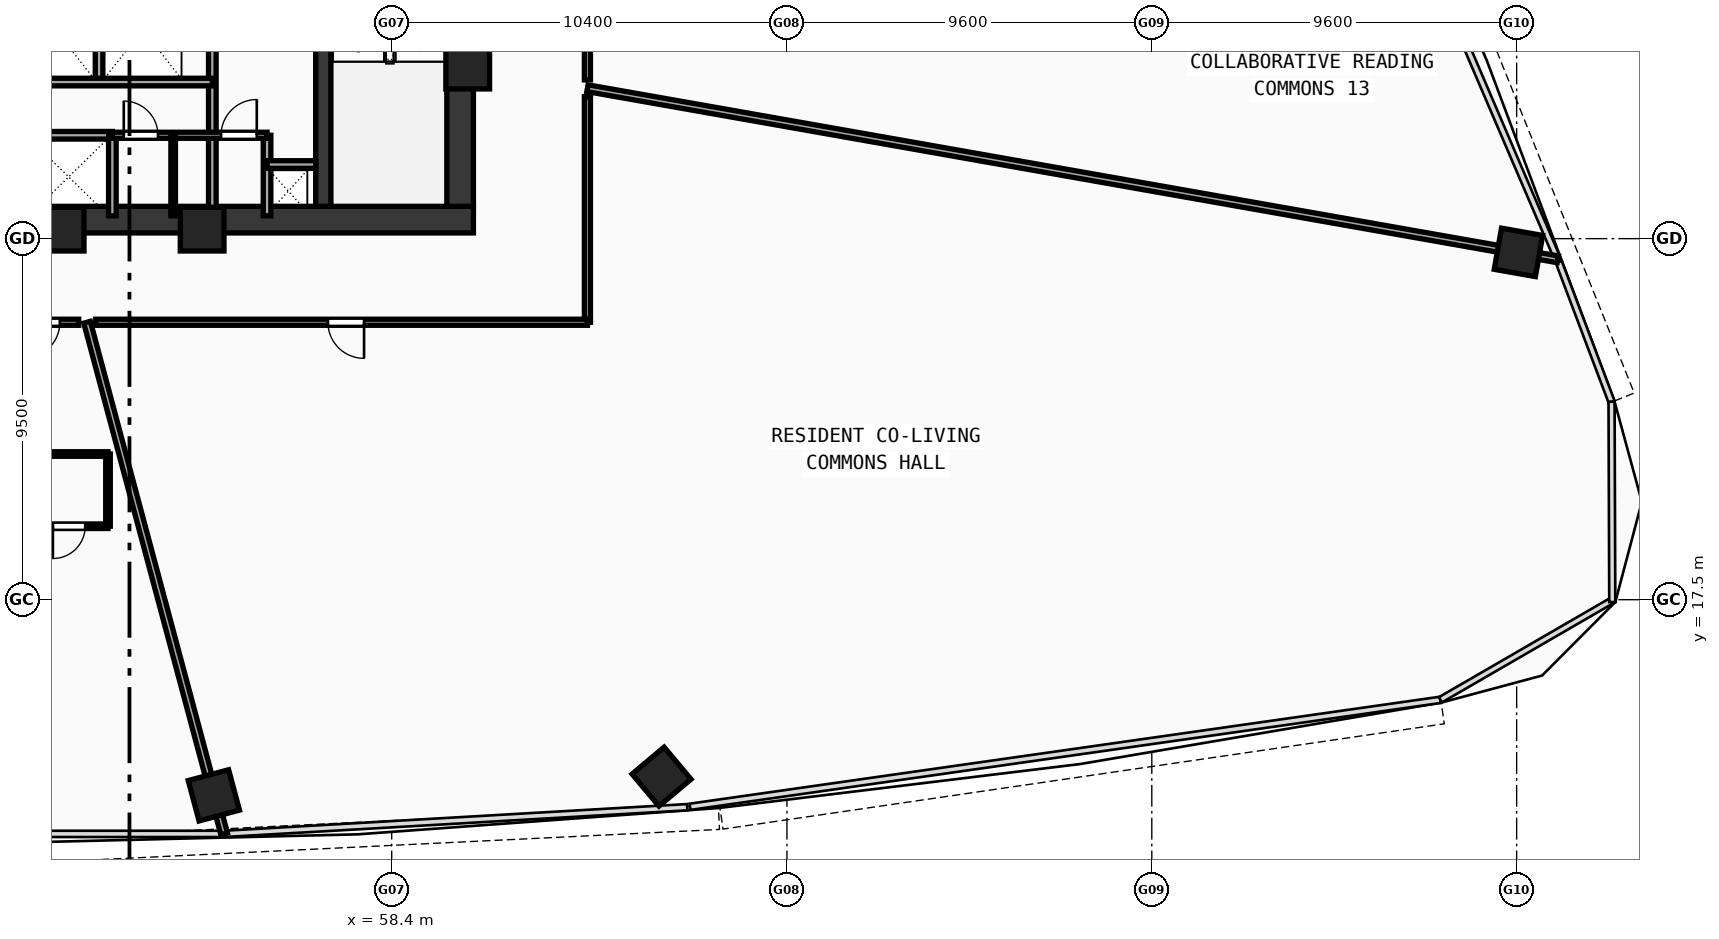
"""IFC4 building model, lengths in metres.
Left out: names, types, materials, properties, quantities, classifications, styles, units other than length and angle.
Written with IfcOpenShell. Run it as: python <this file> out.ifc"""

import sys

from ifc_helpers import new_model, si_unit, direction, frame, frame_2d, origin, origin_with_axes, origin_2d, place, context, subcontext, project, spatial, rectangle, hollow_rectangle, extrude, source, transform, mapped, element, fill, save


model = new_model("IFC4")
c1 = context("Model", 3, precision=1e-05, world=origin(), true_north=direction((0.0, 1.0)))
c2 = subcontext(c1, "Body", "Model", "MODEL_VIEW")
j1 = project(units=[si_unit("LENGTHUNIT", "METRE"), si_unit("PLANEANGLEUNIT", "RADIAN")], contexts=[c1])
p1 = place(None, origin())
s1 = spatial("IfcSite", under=j1, at=p1, CompositionType="ELEMENT")
p2 = place(p1, origin())
s2 = spatial("IfcBuilding", under=s1, at=p2, CompositionType="ELEMENT")
p3 = place(p2, frame((0.0, 0.0, 70.33)))
s3 = spatial("IfcBuildingStorey", under=s2, at=p3, CompositionType="ELEMENT", Elevation=70.33)
p4 = place(p3, frame((35.45, 27.5, 0.0), z_axis=(0.0, 0.0, 1.0), x_axis=(1.0, 0.0, 0.0)))
e1 = element("IfcWall", 1, at=p4, inside=s3, PredefinedType="SHEAR", context=c2, shape_type="SweptSolid", body=[
    extrude(rectangle(XDim=25.1, YDim=0.7, at=frame_2d((12.55, 0.0))), origin(), (0.0, 0.0, 1.0), 5.77),
])
p5 = place(p3, frame((60.2, 27.85, 0.0), z_axis=(0.0, 0.0, 1.0), x_axis=(0.0, 1.0, 0.0)))
e2 = element("IfcWall", 2, at=p5, inside=s3, PredefinedType="SHEAR", context=c2, shape_type="SweptSolid", body=[
    extrude(rectangle(XDim=12.0, YDim=0.7, at=frame_2d((6.0, 0.0))), origin(), (0.0, 0.0, 1.0), 5.77),
])
p6 = place(p3, frame((56.6, 27.85, 0.0), z_axis=(0.0, 0.0, 1.0), x_axis=(0.0, 1.0, 0.0)))
e3 = element("IfcWall", 3, at=p6, inside=s3, PredefinedType="SHEAR", context=c2, shape_type="SweptSolid", body=[
    extrude(rectangle(XDim=12.0, YDim=0.4, at=frame_2d((6.0, 0.0))), origin(), (0.0, 0.0, 1.0), 5.77),
])
p7 = place(p6, frame((9.9, 0.0, 0.0)))
e4 = element("IfcOpeningElement", 4, at=p7, cuts=e3, PredefinedType="OPENING", context=c2, shape_type="SweptSolid", body=[
    extrude(rectangle(XDim=1.1, YDim=2.1, at=frame_2d((0.55, 1.05))), frame((0.0, 0.21, 0.0), z_axis=(0.0, -1.0, 0.0), x_axis=(1.0, 0.0, 0.0)), (0.0, 0.0, 1.0), 0.42),
])
m1 = source(origin(), c2, "Body", "SweptSolid", [
    extrude(hollow_rectangle(XDim=1.15, YDim=1.15, WallThickness=0.048, at=origin_2d()), origin(), (0.0, 0.0, 1.0), 6.03),
])
for number, where, z_axis, x_axis in (
    (5, (49.729, 27.25, -0.26), (0.0, 0.0, 1.0), (1.0, 0.0, 0.0)),
    (6, (53.412, 27.25, -0.26), (0.0, 0.0, 1.0), (1.0, 0.0, 0.0)),
    (7, (60.4, 31.513, -0.26), (0.0, 0.0, 1.0), (1.0, 0.0, 0.0)),
):
    element("IfcColumn", number, at=place(p3, frame(where, z_axis=z_axis, x_axis=x_axis)), inside=s3, PredefinedType="COLUMN", context=c2, shape_type="MappedRepresentation", body=[
        mapped(m1, transform((0.0, 0.0, 0.0), scale=1.0)),
    ])
m2 = source(origin(), c2, "Body", "SweptSolid", [
    extrude(hollow_rectangle(XDim=1.1, YDim=1.1, WallThickness=0.045, at=origin_2d()), origin(), (0.0, 0.0, 1.0), 6.03),
])
for number, where, z_axis, x_axis in (
    (8, (53.72, 12.352, -0.26), (0.0, 0.0, 1.0), (0.966, 0.259, 0.0)),
    (9, (65.5, 12.844, -0.26), (0.0, 0.0, 1.0), (0.766, 0.643, 0.0)),
    (10, (88.048, 26.638, -0.26), (0.0, 0.0, 1.0), (0.174, 0.985, 0.0)),
):
    element("IfcColumn", number, at=place(p3, frame(where, z_axis=z_axis, x_axis=x_axis)), inside=s3, PredefinedType="COLUMN", context=c2, shape_type="MappedRepresentation", body=[
        mapped(m2, transform((0.0, 0.0, 0.0), scale=1.0)),
    ])
p8 = place(p3, frame((53.68, 27.6, 0.0), z_axis=(0.0, 0.0, 1.0), x_axis=(0.0, 1.0, 0.0)))
e11 = element("IfcWall", 11, at=p8, inside=s3, PredefinedType="SOLIDWALL", context=c2, shape_type="SweptSolid", body=[
    extrude(rectangle(XDim=9.05, YDim=0.2, at=frame_2d((4.525, 0.0))), origin(), (0.0, 0.0, 1.0), 2.42),
])
p9 = place(p8, frame((6.9, 0.0, 0.0)))
e12 = element("IfcOpeningElement", 12, at=p9, cuts=e11, PredefinedType="OPENING", context=c2, shape_type="SweptSolid", body=[
    extrude(rectangle(XDim=1.05, YDim=2.1, at=frame_2d((0.525, 1.05))), frame((0.0, 0.11, 0.0), z_axis=(0.0, -1.0, 0.0), x_axis=(1.0, 0.0, 0.0)), (0.0, 0.0, 1.0), 0.22),
])
p10 = place(p3, frame((50.7, 31.12, 0.0), z_axis=(0.0, 0.0, 1.0), x_axis=(0.0, 1.0, 0.0)))
e13 = element("IfcWall", 13, at=p10, inside=s3, PredefinedType="SOLIDWALL", context=c2, shape_type="SweptSolid", body=[
    extrude(rectangle(XDim=2.7, YDim=0.2, at=frame_2d((1.35, 0.0))), origin(), (0.0, 0.0, 1.0), 5.77),
])
p11 = place(p3, frame((43.85, 29.72, 0.0), z_axis=(0.0, 0.0, 1.0), x_axis=(1.0, 0.0, 0.0)))
e14 = element("IfcWall", 14, at=p11, inside=s3, PredefinedType="SOLIDWALL", context=c2, shape_type="SweptSolid", body=[
    extrude(rectangle(XDim=7.2, YDim=0.2, at=frame_2d((3.6, 0.0))), origin(), (0.0, 0.0, 1.0), 5.77),
])
p12 = place(p3, frame((51.05, 27.6, 0.0), z_axis=(0.0, 0.0, 1.0), x_axis=(0.0, 1.0, 0.0)))
e15 = element("IfcWall", 15, at=p12, inside=s3, PredefinedType="SOLIDWALL", context=c2, shape_type="SweptSolid", body=[
    extrude(rectangle(XDim=2.12, YDim=0.2, at=frame_2d((1.06, 0.0))), origin(), (0.0, 0.0, 1.0), 5.77),
])
p13 = place(p3, frame((43.85, 31.12, 0.0), z_axis=(0.0, 0.0, 1.0), x_axis=(1.0, 0.0, 0.0)))
e16 = element("IfcWall", 16, at=p13, inside=s3, PredefinedType="SOLIDWALL", context=c2, shape_type="SweptSolid", body=[
    extrude(rectangle(XDim=9.83, YDim=0.2, at=frame_2d((4.915, 0.0))), origin(), (0.0, 0.0, 1.0), 5.77),
])
p14 = place(p3, frame((55.12, 27.6, 0.0), z_axis=(0.0, 0.0, 1.0), x_axis=(0.0, 1.0, 0.0)))
e17 = element("IfcWall", 17, at=p14, inside=s3, PredefinedType="SOLIDWALL", context=c2, shape_type="SweptSolid", body=[
    extrude(rectangle(XDim=2.12, YDim=0.2, at=frame_2d((1.06, 0.0))), origin(), (0.0, 0.0, 1.0), 5.77),
])
p15 = place(p3, frame((55.12, 28.95, 0.0), z_axis=(0.0, 0.0, 1.0), x_axis=(1.0, 0.0, 0.0)))
e18 = element("IfcWall", 18, at=p15, inside=s3, PredefinedType="SOLIDWALL", context=c2, shape_type="SweptSolid", body=[
    extrude(rectangle(XDim=1.28, YDim=0.2, at=frame_2d((0.64, 0.0))), origin(), (0.0, 0.0, 1.0), 5.77),
])
p16 = place(p3, frame((51.05, 29.72, 0.0), z_axis=(0.0, 0.0, 1.0), x_axis=(1.0, 0.0, 0.0)))
e19 = element("IfcWall", 19, at=p16, inside=s3, PredefinedType="PARTITIONING", context=c2, shape_type="SweptSolid", body=[
    extrude(rectangle(XDim=4.07, YDim=0.16, at=frame_2d((2.035, 0.0))), origin(), (0.0, 0.0, 1.0), 5.77),
])
p17 = place(p16, frame((0.3, 0.0, 0.0)))
e20 = element("IfcOpeningElement", 20, at=p17, cuts=e19, PredefinedType="OPENING", context=c2, shape_type="SweptSolid", body=[
    extrude(rectangle(XDim=0.9, YDim=2.1, at=frame_2d((0.45, 1.05))), frame((0.0, 0.09, 0.0), z_axis=(0.0, -1.0, 0.0), x_axis=(1.0, 0.0, 0.0)), (0.0, 0.0, 1.0), 0.18),
])
p18 = place(p16, frame((2.86, 0.0, 0.0)))
e21 = element("IfcOpeningElement", 21, at=p18, cuts=e19, PredefinedType="OPENING", context=c2, shape_type="SweptSolid", body=[
    extrude(rectangle(XDim=0.94, YDim=2.1, at=frame_2d((0.47, 1.05))), frame((0.0, 0.09, 0.0), z_axis=(0.0, -1.0, 0.0), x_axis=(1.0, 0.0, 0.0)), (0.0, 0.0, 1.0), 0.18),
])
p19 = place(p3, frame((52.65, 27.6, 0.0), z_axis=(0.0, 0.0, 1.0), x_axis=(0.0, 1.0, 0.0)))
e22 = element("IfcWall", 22, at=p19, inside=s3, PredefinedType="PARTITIONING", context=c2, shape_type="SweptSolid", body=[
    extrude(rectangle(XDim=2.12, YDim=0.12, at=frame_2d((1.06, 0.0))), origin(), (0.0, 0.0, 1.0), 5.77),
])
p20 = place(p3, frame((50.385, 24.8, 0.0), z_axis=(0.0, 0.0, 1.0), x_axis=(0.258819267056, -0.965925766817, 0.0)))
e23 = element("IfcWall", 23, at=p20, inside=s3, PredefinedType="PARTITIONING", context=c2, shape_type="SweptSolid", body=[
    extrude(rectangle(XDim=13.937, YDim=0.18, at=frame_2d((6.969, 0.0))), origin(), (0.0, 0.0, 1.0), 2.42),
])
p21 = place(p3, frame((63.55, 30.958, 0.0), z_axis=(0.0, 0.0, 1.0), x_axis=(0.984809239356, -0.173639747982, 0.0)))
e24 = element("IfcWall", 24, at=p21, inside=s3, PredefinedType="PARTITIONING", context=c2, shape_type="SweptSolid", body=[
    extrude(rectangle(XDim=25.926, YDim=0.18, at=frame_2d((12.963, 0.0))), origin(), (0.0, 0.0, 1.0), 2.42),
])
p22 = place(p3, frame((63.55, 34.023, 0.0), z_axis=(0.0, 0.0, 1.0), x_axis=(0.0, -1.0, 0.0)))
e25 = element("IfcWall", 25, at=p22, inside=s3, PredefinedType="PARTITIONING", context=c2, shape_type="SweptSolid", body=[
    extrude(rectangle(XDim=2.845, YDim=0.16, at=frame_2d((1.423, 0.0))), origin(), (0.0, 0.0, 1.0), 2.42),
])
p23 = place(p22, frame((0.948, 0.0, 0.0)))
e26 = element("IfcOpeningElement", 26, at=p23, cuts=e25, PredefinedType="OPENING", context=c2, shape_type="SweptSolid", body=[
    extrude(rectangle(XDim=0.95, YDim=2.1, at=frame_2d((0.475, 1.05))), frame((0.0, 0.09, 0.0), z_axis=(0.0, -1.0, 0.0), x_axis=(1.0, 0.0, 0.0)), (0.0, 0.0, 1.0), 0.18),
])
p24 = place(p3, frame((63.55, 30.735, 0.0), z_axis=(0.0, 0.0, 1.0), x_axis=(0.0, -1.0, 0.0)))
e27 = element("IfcWall", 27, at=p24, inside=s3, PredefinedType="PARTITIONING", context=c2, shape_type="SweptSolid", body=[
    extrude(rectangle(XDim=5.935, YDim=0.16, at=frame_2d((2.967, 0.0))), origin(), (0.0, 0.0, 1.0), 2.42),
])
p25 = place(p3, frame((63.55, 24.8, 0.0), z_axis=(0.0, 0.0, 1.0), x_axis=(-1.0, 0.0, 0.0)))
e28 = element("IfcWall", 28, at=p25, inside=s3, PredefinedType="PARTITIONING", context=c2, shape_type="SweptSolid", body=[
    extrude(rectangle(XDim=12.938, YDim=0.16, at=frame_2d((6.469, 0.0))), origin(), (0.0, 0.0, 1.0), 2.42),
])
p26 = place(p25, frame((5.878, 0.0, 0.0)))
e29 = element("IfcOpeningElement", 29, at=p26, cuts=e28, PredefinedType="OPENING", context=c2, shape_type="SweptSolid", body=[
    extrude(rectangle(XDim=0.95, YDim=2.1, at=frame_2d((0.475, 1.05))), frame((0.0, 0.09, 0.0), z_axis=(0.0, -1.0, 0.0), x_axis=(1.0, 0.0, 0.0)), (0.0, 0.0, 1.0), 0.18),
])
p27 = place(p3, frame((50.165, 24.8, 0.0), z_axis=(0.0, 0.0, 1.0), x_axis=(-1.0, 0.0, 0.0)))
e30 = element("IfcWall", 30, at=p27, inside=s3, PredefinedType="PARTITIONING", context=c2, shape_type="SweptSolid", body=[
    extrude(rectangle(XDim=1.945, YDim=0.16, at=frame_2d((0.972, 0.0))), origin(), (0.0, 0.0, 1.0), 2.42),
])
p28 = place(p27, frame((0.498, 0.0, 0.0)))
e31 = element("IfcOpeningElement", 31, at=p28, cuts=e30, PredefinedType="OPENING", context=c2, shape_type="SweptSolid", body=[
    extrude(rectangle(XDim=0.95, YDim=2.1, at=frame_2d((0.475, 1.05))), frame((0.0, 0.09, 0.0), z_axis=(0.0, -1.0, 0.0), x_axis=(1.0, 0.0, 0.0)), (0.0, 0.0, 1.0), 0.18),
])
p29 = place(p3, frame((48.885, 19.433, 0.0), z_axis=(0.0, 0.0, 1.0), x_axis=(1.0, 0.0, 0.0)))
e32 = element("IfcWall", 32, at=p29, inside=s3, PredefinedType="PARTITIONING", context=c2, shape_type="SweptSolid", body=[
    extrude(rectangle(XDim=2.05, YDim=0.12, at=frame_2d((1.025, 0.0))), origin(), (0.0, 0.0, 1.0), 5.77),
])
p30 = place(p29, frame((0.6, 0.0, 0.0)))
e33 = element("IfcOpeningElement", 33, at=p30, cuts=e32, PredefinedType="OPENING", context=c2, shape_type="SweptSolid", body=[
    extrude(rectangle(XDim=0.85, YDim=2.1, at=frame_2d((0.425, 1.05))), frame((0.0, 0.07, 0.0), z_axis=(0.0, -1.0, 0.0), x_axis=(1.0, 0.0, 0.0)), (0.0, 0.0, 1.0), 0.14),
])
p31 = place(p3, frame((50.935, 19.433, 0.0), z_axis=(0.0, 0.0, 1.0), x_axis=(0.0, 1.0, 0.0)))
e34 = element("IfcWall", 34, at=p31, inside=s3, PredefinedType="PARTITIONING", context=c2, shape_type="SweptSolid", body=[
    extrude(rectangle(XDim=1.9, YDim=0.12, at=frame_2d((0.95, 0.0))), origin(), (0.0, 0.0, 1.0), 2.42),
])
p32 = place(p3, frame((50.935, 21.333, 0.0), z_axis=(0.0, 0.0, 1.0), x_axis=(-1.0, 0.0, 0.0)))
e35 = element("IfcWall", 35, at=p32, inside=s3, PredefinedType="PARTITIONING", context=c2, shape_type="SweptSolid", body=[
    extrude(rectangle(XDim=2.05, YDim=0.12, at=frame_2d((1.025, 0.0))), origin(), (0.0, 0.0, 1.0), 2.42),
])
m3 = source(origin(), c2, "Body", "SweptSolid", [
    extrude(rectangle(XDim=0.9, YDim=2.1, at=frame_2d((0.45, 1.05))), frame((0.0, 0.025, 0.0), z_axis=(0.0, -1.0, 0.0), x_axis=(1.0, 0.0, 0.0)), (0.0, 0.0, 1.0), 0.05),
])
p33 = place(p17, origin_with_axes())
e36 = element("IfcDoor", 36, at=p33, inside=s3, OperationType="SINGLE_SWING_LEFT", PredefinedType="DOOR", context=c2, shape_type="MappedRepresentation", body=[
    mapped(m3, transform((0.0, 0.0, 0.0), scale=1.0)),
])
fill(e20, e36)
m4 = source(origin(), c2, "Body", "SweptSolid", [
    extrude(rectangle(XDim=0.94, YDim=2.1, at=frame_2d((0.47, 1.05))), frame((0.0, 0.025, 0.0), z_axis=(0.0, -1.0, 0.0), x_axis=(1.0, 0.0, 0.0)), (0.0, 0.0, 1.0), 0.05),
])
p34 = place(p18, origin_with_axes())
e37 = element("IfcDoor", 37, at=p34, inside=s3, OperationType="SINGLE_SWING_RIGHT", PredefinedType="DOOR", context=c2, shape_type="MappedRepresentation", body=[
    mapped(m4, transform((0.0, 0.0, 0.0), scale=1.0)),
])
fill(e21, e37)
m5 = source(origin(), c2, "Body", "SweptSolid", [
    extrude(rectangle(XDim=0.95, YDim=2.1, at=frame_2d((0.475, 1.05))), frame((0.0, 0.025, 0.0), z_axis=(0.0, -1.0, 0.0), x_axis=(1.0, 0.0, 0.0)), (0.0, 0.0, 1.0), 0.05),
])
p35 = place(p28, origin_with_axes())
e38 = element("IfcDoor", 38, at=p35, inside=s3, OperationType="SINGLE_SWING_RIGHT", PredefinedType="DOOR", context=c2, shape_type="MappedRepresentation", body=[
    mapped(m5, transform((0.0, 0.0, 0.0), scale=1.0)),
])
fill(e31, e38)
m6 = source(origin(), c2, "Body", "SweptSolid", [
    extrude(rectangle(XDim=0.85, YDim=2.1, at=frame_2d((0.425, 1.05))), frame((0.0, 0.025, 0.0), z_axis=(0.0, -1.0, 0.0), x_axis=(1.0, 0.0, 0.0)), (0.0, 0.0, 1.0), 0.05),
])
p36 = place(p30, frame((0.85, 0.0, 0.0), z_axis=(0.0, 0.0, 1.0), x_axis=(-1.0, 0.0, 0.0)))
e39 = element("IfcDoor", 39, at=p36, inside=s3, OperationType="SINGLE_SWING_RIGHT", PredefinedType="DOOR", context=c2, shape_type="MappedRepresentation", body=[
    mapped(m6, transform((0.0, 0.0, 0.0), scale=1.0)),
])
fill(e33, e39)
p37 = place(p26, origin_with_axes())
e40 = element("IfcDoor", 40, at=p37, inside=s3, OperationType="SINGLE_SWING_LEFT", PredefinedType="DOOR", context=c2, shape_type="MappedRepresentation", body=[
    mapped(m5, transform((0.0, 0.0, 0.0), scale=1.0)),
])
fill(e29, e40)
save(model, sys.argv[1])
